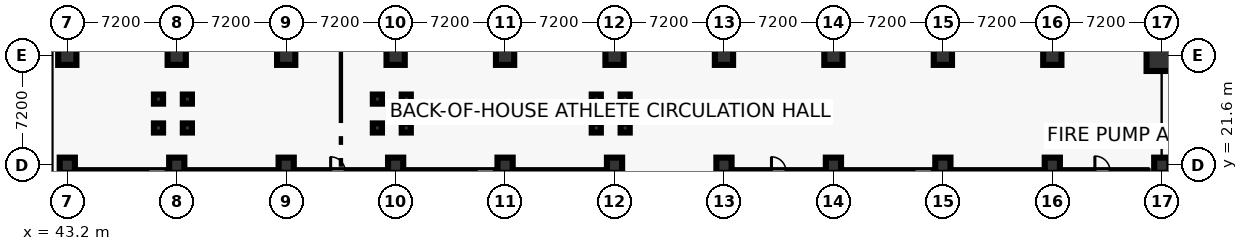
"""IFC4 building model, lengths in metres.
Left out: names, types, materials, properties, quantities, classifications, styles, units other than length and angle.
Written with IfcOpenShell. Run it as: python <this file> out.ifc"""

import sys

from ifc_helpers import new_model, si_unit, direction, frame, frame_2d, origin, origin_2d, place, context, subcontext, project, spatial, rectangle, circle, extrude, element, fill, save


model = new_model("IFC4")
c1 = context("Model", 3, precision=1e-05, world=origin(), true_north=direction((0.0, 1.0)))
c2 = subcontext(c1, "Body", "Model", "MODEL_VIEW")
j1 = project(units=[si_unit("LENGTHUNIT", "METRE"), si_unit("PLANEANGLEUNIT", "RADIAN")], contexts=[c1])
p1 = place(None, origin())
s1 = spatial("IfcSite", under=j1, at=p1, CompositionType="ELEMENT")
p2 = place(p1, origin())
s2 = spatial("IfcBuilding", under=s1, at=p2, CompositionType="ELEMENT")
p3 = place(p2, frame((0.0, 0.0, -5.4)))
s3 = spatial("IfcBuildingStorey", under=s2, at=p3, CompositionType="ELEMENT", Elevation=-5.4)
p4 = place(p3, frame((43.2, 21.6, 0.0), z_axis=(0.0, 0.0, 1.0), x_axis=(1.0, 0.0, 0.0)))
e1 = element("IfcColumn", 1, at=p4, inside=s3, PredefinedType="COLUMN", context=c2, shape_type="SweptSolid", body=[
    extrude(rectangle(XDim=1.0, YDim=1.0, at=origin_2d()), origin(), (0.0, 0.0, 1.0), 5.4),
])
p5 = place(p3, frame((43.2, 28.8, 0.0), z_axis=(0.0, 0.0, 1.0), x_axis=(1.0, 0.0, 0.0)))
e2 = element("IfcColumn", 2, at=p5, inside=s3, PredefinedType="COLUMN", context=c2, shape_type="SweptSolid", body=[
    extrude(circle(Radius=0.6, at=origin_2d()), origin(), (0.0, 0.0, 1.0), 5.4),
])
p6 = place(p3, frame((50.4, 21.6, 0.0), z_axis=(0.0, 0.0, 1.0), x_axis=(1.0, 0.0, 0.0)))
e3 = element("IfcColumn", 3, at=p6, inside=s3, PredefinedType="COLUMN", context=c2, shape_type="SweptSolid", body=[
    extrude(rectangle(XDim=1.0, YDim=1.0, at=origin_2d()), origin(), (0.0, 0.0, 1.0), 5.4),
])
p7 = place(p3, frame((50.4, 28.8, 0.0), z_axis=(0.0, 0.0, 1.0), x_axis=(1.0, 0.0, 0.0)))
e4 = element("IfcColumn", 4, at=p7, inside=s3, PredefinedType="COLUMN", context=c2, shape_type="SweptSolid", body=[
    extrude(circle(Radius=0.6, at=origin_2d()), origin(), (0.0, 0.0, 1.0), 5.4),
])
p8 = place(p3, frame((57.6, 21.6, 0.0), z_axis=(0.0, 0.0, 1.0), x_axis=(1.0, 0.0, 0.0)))
e5 = element("IfcColumn", 5, at=p8, inside=s3, PredefinedType="COLUMN", context=c2, shape_type="SweptSolid", body=[
    extrude(rectangle(XDim=1.0, YDim=1.0, at=origin_2d()), origin(), (0.0, 0.0, 1.0), 5.4),
])
p9 = place(p3, frame((57.6, 28.8, 0.0), z_axis=(0.0, 0.0, 1.0), x_axis=(1.0, 0.0, 0.0)))
e6 = element("IfcColumn", 6, at=p9, inside=s3, PredefinedType="COLUMN", context=c2, shape_type="SweptSolid", body=[
    extrude(circle(Radius=0.6, at=origin_2d()), origin(), (0.0, 0.0, 1.0), 5.4),
])
p10 = place(p3, frame((64.8, 21.6, 0.0), z_axis=(0.0, 0.0, 1.0), x_axis=(1.0, 0.0, 0.0)))
e7 = element("IfcColumn", 7, at=p10, inside=s3, PredefinedType="COLUMN", context=c2, shape_type="SweptSolid", body=[
    extrude(rectangle(XDim=1.0, YDim=1.0, at=origin_2d()), origin(), (0.0, 0.0, 1.0), 5.4),
])
p11 = place(p3, frame((64.8, 28.8, 0.0), z_axis=(0.0, 0.0, 1.0), x_axis=(1.0, 0.0, 0.0)))
e8 = element("IfcColumn", 8, at=p11, inside=s3, PredefinedType="COLUMN", context=c2, shape_type="SweptSolid", body=[
    extrude(circle(Radius=0.6, at=origin_2d()), origin(), (0.0, 0.0, 1.0), 5.4),
])
p12 = place(p3, frame((72.0, 21.6, 0.0), z_axis=(0.0, 0.0, 1.0), x_axis=(1.0, 0.0, 0.0)))
e9 = element("IfcColumn", 9, at=p12, inside=s3, PredefinedType="COLUMN", context=c2, shape_type="SweptSolid", body=[
    extrude(rectangle(XDim=1.0, YDim=1.0, at=origin_2d()), origin(), (0.0, 0.0, 1.0), 5.4),
])
p13 = place(p3, frame((72.0, 28.8, 0.0), z_axis=(0.0, 0.0, 1.0), x_axis=(1.0, 0.0, 0.0)))
e10 = element("IfcColumn", 10, at=p13, inside=s3, PredefinedType="COLUMN", context=c2, shape_type="SweptSolid", body=[
    extrude(circle(Radius=0.6, at=origin_2d()), origin(), (0.0, 0.0, 1.0), 5.4),
])
p14 = place(p3, frame((79.2, 21.6, 0.0), z_axis=(0.0, 0.0, 1.0), x_axis=(1.0, 0.0, 0.0)))
e11 = element("IfcColumn", 11, at=p14, inside=s3, PredefinedType="COLUMN", context=c2, shape_type="SweptSolid", body=[
    extrude(rectangle(XDim=1.0, YDim=1.0, at=origin_2d()), origin(), (0.0, 0.0, 1.0), 5.4),
])
p15 = place(p3, frame((79.2, 28.8, 0.0), z_axis=(0.0, 0.0, 1.0), x_axis=(1.0, 0.0, 0.0)))
e12 = element("IfcColumn", 12, at=p15, inside=s3, PredefinedType="COLUMN", context=c2, shape_type="SweptSolid", body=[
    extrude(circle(Radius=0.6, at=origin_2d()), origin(), (0.0, 0.0, 1.0), 5.4),
])
p16 = place(p3, frame((86.4, 21.6, 0.0), z_axis=(0.0, 0.0, 1.0), x_axis=(1.0, 0.0, 0.0)))
e13 = element("IfcColumn", 13, at=p16, inside=s3, PredefinedType="COLUMN", context=c2, shape_type="SweptSolid", body=[
    extrude(rectangle(XDim=1.0, YDim=1.0, at=origin_2d()), origin(), (0.0, 0.0, 1.0), 5.4),
])
p17 = place(p3, frame((86.4, 28.8, 0.0), z_axis=(0.0, 0.0, 1.0), x_axis=(1.0, 0.0, 0.0)))
e14 = element("IfcColumn", 14, at=p17, inside=s3, PredefinedType="COLUMN", context=c2, shape_type="SweptSolid", body=[
    extrude(circle(Radius=0.6, at=origin_2d()), origin(), (0.0, 0.0, 1.0), 5.4),
])
p18 = place(p3, frame((93.6, 21.6, 0.0), z_axis=(0.0, 0.0, 1.0), x_axis=(1.0, 0.0, 0.0)))
e15 = element("IfcColumn", 15, at=p18, inside=s3, PredefinedType="COLUMN", context=c2, shape_type="SweptSolid", body=[
    extrude(rectangle(XDim=1.0, YDim=1.0, at=origin_2d()), origin(), (0.0, 0.0, 1.0), 5.4),
])
p19 = place(p3, frame((93.6, 28.8, 0.0), z_axis=(0.0, 0.0, 1.0), x_axis=(1.0, 0.0, 0.0)))
e16 = element("IfcColumn", 16, at=p19, inside=s3, PredefinedType="COLUMN", context=c2, shape_type="SweptSolid", body=[
    extrude(circle(Radius=0.6, at=origin_2d()), origin(), (0.0, 0.0, 1.0), 5.4),
])
p20 = place(p3, frame((100.8, 21.6, 0.0), z_axis=(0.0, 0.0, 1.0), x_axis=(1.0, 0.0, 0.0)))
e17 = element("IfcColumn", 17, at=p20, inside=s3, PredefinedType="COLUMN", context=c2, shape_type="SweptSolid", body=[
    extrude(rectangle(XDim=1.0, YDim=1.0, at=origin_2d()), origin(), (0.0, 0.0, 1.0), 5.4),
])
p21 = place(p3, frame((100.8, 28.8, 0.0), z_axis=(0.0, 0.0, 1.0), x_axis=(1.0, 0.0, 0.0)))
e18 = element("IfcColumn", 18, at=p21, inside=s3, PredefinedType="COLUMN", context=c2, shape_type="SweptSolid", body=[
    extrude(circle(Radius=0.6, at=origin_2d()), origin(), (0.0, 0.0, 1.0), 5.4),
])
p22 = place(p3, frame((108.0, 21.6, 0.0), z_axis=(0.0, 0.0, 1.0), x_axis=(1.0, 0.0, 0.0)))
e19 = element("IfcColumn", 19, at=p22, inside=s3, PredefinedType="COLUMN", context=c2, shape_type="SweptSolid", body=[
    extrude(rectangle(XDim=1.0, YDim=1.0, at=origin_2d()), origin(), (0.0, 0.0, 1.0), 5.4),
])
p23 = place(p3, frame((108.0, 28.8, 0.0), z_axis=(0.0, 0.0, 1.0), x_axis=(1.0, 0.0, 0.0)))
e20 = element("IfcColumn", 20, at=p23, inside=s3, PredefinedType="COLUMN", context=c2, shape_type="SweptSolid", body=[
    extrude(circle(Radius=0.6, at=origin_2d()), origin(), (0.0, 0.0, 1.0), 5.4),
])
p24 = place(p3, frame((115.2, 21.6, 0.0), z_axis=(0.0, 0.0, 1.0), x_axis=(1.0, 0.0, 0.0)))
e21 = element("IfcColumn", 21, at=p24, inside=s3, PredefinedType="COLUMN", context=c2, shape_type="SweptSolid", body=[
    extrude(circle(Radius=0.5, at=origin_2d()), origin(), (0.0, 0.0, 1.0), 5.4),
])
p25 = place(p3, frame((115.2, 28.8, 0.0), z_axis=(0.0, 0.0, 1.0), x_axis=(1.0, 0.0, 0.0)))
e22 = element("IfcColumn", 22, at=p25, inside=s3, PredefinedType="COLUMN", context=c2, shape_type="SweptSolid", body=[
    extrude(circle(Radius=1.0, at=origin_2d()), origin(), (0.0, 0.0, 1.0), 5.4),
])
for number, where, z_axis, x_axis in (
    (23, (49.2, 24.05, 0.0), (0.0, 0.0, 1.0), (1.0, 0.0, 0.0)),
    (24, (51.1, 24.05, 0.0), (0.0, 0.0, 1.0), (1.0, 0.0, 0.0)),
    (25, (49.2, 25.95, 0.0), (0.0, 0.0, 1.0), (1.0, 0.0, 0.0)),
    (26, (51.1, 25.95, 0.0), (0.0, 0.0, 1.0), (1.0, 0.0, 0.0)),
    (27, (63.6, 24.05, 0.0), (0.0, 0.0, 1.0), (1.0, 0.0, 0.0)),
    (28, (65.5, 24.05, 0.0), (0.0, 0.0, 1.0), (1.0, 0.0, 0.0)),
    (29, (63.6, 25.95, 0.0), (0.0, 0.0, 1.0), (1.0, 0.0, 0.0)),
    (30, (65.5, 25.95, 0.0), (0.0, 0.0, 1.0), (1.0, 0.0, 0.0)),
    (31, (78.0, 24.05, 0.0), (0.0, 0.0, 1.0), (1.0, 0.0, 0.0)),
    (32, (79.9, 24.05, 0.0), (0.0, 0.0, 1.0), (1.0, 0.0, 0.0)),
    (33, (78.0, 25.95, 0.0), (0.0, 0.0, 1.0), (1.0, 0.0, 0.0)),
    (34, (79.9, 25.95, 0.0), (0.0, 0.0, 1.0), (1.0, 0.0, 0.0)),
):
    element("IfcColumn", number, at=place(p3, frame(where, z_axis=z_axis, x_axis=x_axis)), inside=s3, PredefinedType="COLUMN", context=c2, shape_type="SweptSolid", body=[
        extrude(rectangle(XDim=0.6, YDim=0.6, at=origin_2d()), origin(), (0.0, 0.0, 1.0), 5.4),
    ])
p26 = place(p3, frame((56.8, 21.2, 0.0), z_axis=(0.0, 0.0, 1.0), x_axis=(-1.0, 0.0, 0.0)))
e35 = element("IfcWall", 35, at=p26, inside=s3, PredefinedType="PARTITIONING", context=c2, shape_type="SweptSolid", body=[
    extrude(rectangle(XDim=12.8, YDim=0.15, at=frame_2d((6.4, 0.0))), origin(), (0.0, 0.0, 1.0), 4.04),
])
p27 = place(p26, frame((7.1, 0.0, 0.0)))
e36 = element("IfcOpeningElement", 36, at=p27, cuts=e35, PredefinedType="OPENING", context=c2, shape_type="SweptSolid", body=[
    extrude(rectangle(XDim=1.2, YDim=2.2, at=frame_2d((0.6, 1.1))), frame((0.0, 0.085, 0.0), z_axis=(0.0, -1.0, 0.0), x_axis=(1.0, 0.0, 0.0)), (0.0, 0.0, 1.0), 0.17),
])
p28 = place(p3, frame((64.0, 21.2, 0.0), z_axis=(0.0, 0.0, 1.0), x_axis=(-1.0, 0.0, 0.0)))
e37 = element("IfcWall", 37, at=p28, inside=s3, PredefinedType="PARTITIONING", context=c2, shape_type="SweptSolid", body=[
    extrude(rectangle(XDim=6.0, YDim=0.15, at=frame_2d((3.0, 0.0))), origin(), (0.0, 0.0, 1.0), 4.04),
])
p29 = place(p28, frame((2.525, 0.0, 0.0)))
e38 = element("IfcOpeningElement", 38, at=p29, cuts=e37, PredefinedType="OPENING", context=c2, shape_type="SweptSolid", body=[
    extrude(rectangle(XDim=0.95, YDim=2.15, at=frame_2d((0.475, 1.075))), frame((0.0, 0.085, 0.0), z_axis=(0.0, -1.0, 0.0), x_axis=(1.0, 0.0, 0.0)), (0.0, 0.0, 1.0), 0.17),
])
p30 = place(p3, frame((78.4, 21.2, 0.0), z_axis=(0.0, 0.0, 1.0), x_axis=(-1.0, 0.0, 0.0)))
e39 = element("IfcWall", 39, at=p30, inside=s3, PredefinedType="PARTITIONING", context=c2, shape_type="SweptSolid", body=[
    extrude(rectangle(XDim=12.8, YDim=0.15, at=frame_2d((6.4, 0.0))), origin(), (0.0, 0.0, 1.0), 4.04),
])
p31 = place(p30, frame((7.1, 0.0, 0.0)))
e40 = element("IfcOpeningElement", 40, at=p31, cuts=e39, PredefinedType="OPENING", context=c2, shape_type="SweptSolid", body=[
    extrude(rectangle(XDim=1.2, YDim=2.2, at=frame_2d((0.6, 1.1))), frame((0.0, 0.085, 0.0), z_axis=(0.0, -1.0, 0.0), x_axis=(1.0, 0.0, 0.0)), (0.0, 0.0, 1.0), 0.17),
])
p32 = place(p3, frame((92.8, 21.2, 0.0), z_axis=(0.0, 0.0, 1.0), x_axis=(-1.0, 0.0, 0.0)))
e41 = element("IfcWall", 41, at=p32, inside=s3, PredefinedType="PARTITIONING", context=c2, shape_type="SweptSolid", body=[
    extrude(rectangle(XDim=5.6, YDim=0.15, at=frame_2d((2.8, 0.0))), origin(), (0.0, 0.0, 1.0), 4.04),
])
p33 = place(p32, frame((2.325, 0.0, 0.0)))
e42 = element("IfcOpeningElement", 42, at=p33, cuts=e41, PredefinedType="OPENING", context=c2, shape_type="SweptSolid", body=[
    extrude(rectangle(XDim=0.95, YDim=2.15, at=frame_2d((0.475, 1.075))), frame((0.0, 0.085, 0.0), z_axis=(0.0, -1.0, 0.0), x_axis=(1.0, 0.0, 0.0)), (0.0, 0.0, 1.0), 0.17),
])
p34 = place(p3, frame((107.2, 21.2, 0.0), z_axis=(0.0, 0.0, 1.0), x_axis=(-1.0, 0.0, 0.0)))
e43 = element("IfcWall", 43, at=p34, inside=s3, PredefinedType="PARTITIONING", context=c2, shape_type="SweptSolid", body=[
    extrude(rectangle(XDim=12.8, YDim=0.15, at=frame_2d((6.4, 0.0))), origin(), (0.0, 0.0, 1.0), 4.04),
])
p35 = place(p34, frame((7.1, 0.0, 0.0)))
e44 = element("IfcOpeningElement", 44, at=p35, cuts=e43, PredefinedType="OPENING", context=c2, shape_type="SweptSolid", body=[
    extrude(rectangle(XDim=1.2, YDim=2.2, at=frame_2d((0.6, 1.1))), frame((0.0, 0.085, 0.0), z_axis=(0.0, -1.0, 0.0), x_axis=(1.0, 0.0, 0.0)), (0.0, 0.0, 1.0), 0.17),
])
p36 = place(p3, frame((114.2, 21.2, 0.0), z_axis=(0.0, 0.0, 1.0), x_axis=(-1.0, 0.0, 0.0)))
e45 = element("IfcWall", 45, at=p36, inside=s3, PredefinedType="PARTITIONING", context=c2, shape_type="SweptSolid", body=[
    extrude(rectangle(XDim=5.8, YDim=0.15, at=frame_2d((2.9, 0.0))), origin(), (0.0, 0.0, 1.0), 4.04),
])
p37 = place(p36, frame((2.4, 0.0, 0.0)))
e46 = element("IfcOpeningElement", 46, at=p37, cuts=e45, PredefinedType="OPENING", context=c2, shape_type="SweptSolid", body=[
    extrude(rectangle(XDim=1.0, YDim=2.2, at=frame_2d((0.5, 1.1))), frame((0.0, 0.085, 0.0), z_axis=(0.0, -1.0, 0.0), x_axis=(1.0, 0.0, 0.0)), (0.0, 0.0, 1.0), 0.17),
])
p38 = place(p27, origin())
e47 = element("IfcDoor", 47, at=p38, inside=s3, OperationType="SINGLE_SWING_LEFT", PredefinedType="DOOR", context=c2, shape_type="SweptSolid", body=[
    extrude(rectangle(XDim=1.2, YDim=2.2, at=frame_2d((0.6, 1.1))), frame((0.0, 0.025, 0.0), z_axis=(0.0, -1.0, 0.0), x_axis=(1.0, 0.0, 0.0)), (0.0, 0.0, 1.0), 0.05),
])
fill(e36, e47)
p39 = place(p29, frame((0.95, 0.0, 0.0), z_axis=(0.0, 0.0, 1.0), x_axis=(-1.0, 0.0, 0.0)))
e48 = element("IfcDoor", 48, at=p39, inside=s3, OperationType="SINGLE_SWING_RIGHT", PredefinedType="DOOR", context=c2, shape_type="SweptSolid", body=[
    extrude(rectangle(XDim=0.95, YDim=2.15, at=frame_2d((0.475, 1.075))), frame((0.0, 0.025, 0.0), z_axis=(0.0, -1.0, 0.0), x_axis=(1.0, 0.0, 0.0)), (0.0, 0.0, 1.0), 0.05),
])
fill(e38, e48)
p40 = place(p31, origin())
e49 = element("IfcDoor", 49, at=p40, inside=s3, OperationType="SINGLE_SWING_LEFT", PredefinedType="DOOR", context=c2, shape_type="SweptSolid", body=[
    extrude(rectangle(XDim=1.2, YDim=2.2, at=frame_2d((0.6, 1.1))), frame((0.0, 0.025, 0.0), z_axis=(0.0, -1.0, 0.0), x_axis=(1.0, 0.0, 0.0)), (0.0, 0.0, 1.0), 0.05),
])
fill(e40, e49)
p41 = place(p33, frame((0.95, 0.0, 0.0), z_axis=(0.0, 0.0, 1.0), x_axis=(-1.0, 0.0, 0.0)))
e50 = element("IfcDoor", 50, at=p41, inside=s3, OperationType="SINGLE_SWING_RIGHT", PredefinedType="DOOR", context=c2, shape_type="SweptSolid", body=[
    extrude(rectangle(XDim=0.95, YDim=2.15, at=frame_2d((0.475, 1.075))), frame((0.0, 0.025, 0.0), z_axis=(0.0, -1.0, 0.0), x_axis=(1.0, 0.0, 0.0)), (0.0, 0.0, 1.0), 0.05),
])
fill(e42, e50)
p42 = place(p35, origin())
e51 = element("IfcDoor", 51, at=p42, inside=s3, OperationType="SINGLE_SWING_LEFT", PredefinedType="DOOR", context=c2, shape_type="SweptSolid", body=[
    extrude(rectangle(XDim=1.2, YDim=2.2, at=frame_2d((0.6, 1.1))), frame((0.0, 0.025, 0.0), z_axis=(0.0, -1.0, 0.0), x_axis=(1.0, 0.0, 0.0)), (0.0, 0.0, 1.0), 0.05),
])
fill(e44, e51)
p43 = place(p37, frame((1.0, 0.0, 0.0), z_axis=(0.0, 0.0, 1.0), x_axis=(-1.0, 0.0, 0.0)))
e52 = element("IfcDoor", 52, at=p43, inside=s3, OperationType="SINGLE_SWING_RIGHT", PredefinedType="DOOR", context=c2, shape_type="SweptSolid", body=[
    extrude(rectangle(XDim=1.0, YDim=2.2, at=frame_2d((0.5, 1.1))), frame((0.0, 0.025, 0.0), z_axis=(0.0, -1.0, 0.0), x_axis=(1.0, 0.0, 0.0)), (0.0, 0.0, 1.0), 0.05),
])
fill(e46, e52)
save(model, sys.argv[1])
